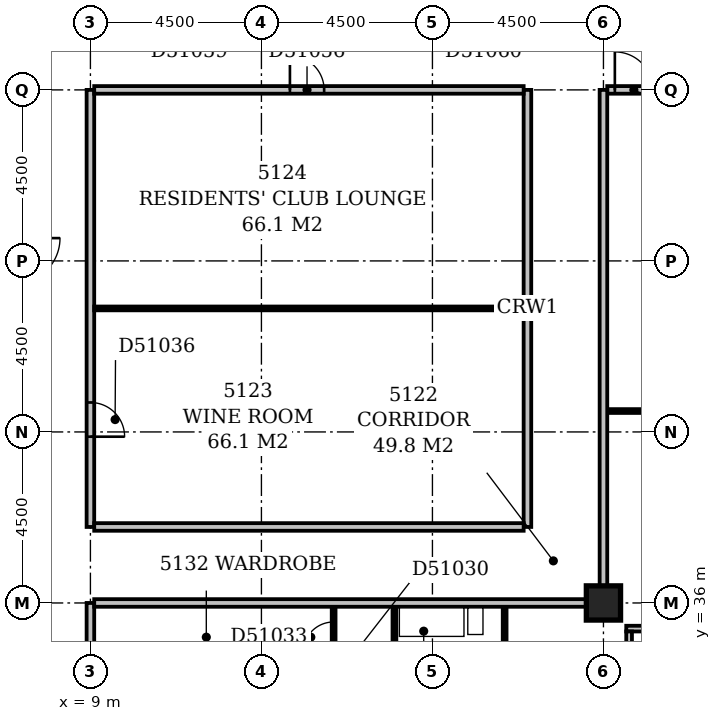
"""IFC4 building model, lengths in metres.
Left out: names, types, materials, properties, quantities, classifications, styles, units other than length and angle.
Written with IfcOpenShell. Run it as: python <this file> out.ifc"""

import sys

from ifc_helpers import new_model, si_unit, direction, frame, frame_2d, origin, origin_2d, place, context, subcontext, project, spatial, rectangle, extrude, element, fill, save


model = new_model("IFC4")
c1 = context("Model", 3, precision=1e-05, world=origin(), true_north=direction((0.0, 1.0)))
c2 = subcontext(c1, "Body", "Model", "MODEL_VIEW")
j1 = project(units=[si_unit("LENGTHUNIT", "METRE"), si_unit("PLANEANGLEUNIT", "RADIAN")], contexts=[c1])
p1 = place(None, origin())
s1 = spatial("IfcSite", under=j1, at=p1, CompositionType="ELEMENT")
p2 = place(p1, origin())
s2 = spatial("IfcBuilding", under=s1, at=p2, CompositionType="ELEMENT")
p3 = place(p2, frame((0.0, 0.0, 200.6)))
s3 = spatial("IfcBuildingStorey", under=s2, at=p3, CompositionType="ELEMENT", Elevation=200.6)
p4 = place(p3, frame((22.5, 36.0, -0.3), z_axis=(0.0, 0.0, 1.0), x_axis=(1.0, 0.0, 0.0)))
e1 = element("IfcColumn", 1, at=p4, inside=s3, PredefinedType="COLUMN", context=c2, shape_type="SweptSolid", body=[
    extrude(rectangle(XDim=0.9, YDim=0.9, at=origin_2d()), origin(), (0.0, 0.0, 1.0), 3.6),
])
p5 = place(p3, frame((23.175, 17.4, 0.0), z_axis=(0.0, 0.0, 1.0), x_axis=(0.0, 1.0, 0.0)))
e2 = element("IfcWall", 2, at=p5, inside=s3, PredefinedType="STANDARD", context=c2, shape_type="SweptSolid", body=[
    extrude(rectangle(XDim=17.85, YDim=0.15, at=frame_2d((8.925, 0.0))), origin(), (0.0, 0.0, 1.0), 2.7),
])
p6 = place(p5, frame((1.65, 0.0, 0.6)))
e3 = element("IfcOpeningElement", 3, at=p6, cuts=e2, PredefinedType="OPENING", context=c2, shape_type="SweptSolid", body=[
    extrude(rectangle(XDim=2.4, YDim=1.8, at=frame_2d((1.2, 0.9))), frame((0.0, 0.087, 0.0), z_axis=(0.0, -1.0, 0.0), x_axis=(1.0, 0.0, 0.0)), (0.0, 0.0, 1.0), 0.174),
])
p7 = place(p5, frame((6.15, 0.0, 0.6)))
e4 = element("IfcOpeningElement", 4, at=p7, cuts=e2, PredefinedType="OPENING", context=c2, shape_type="SweptSolid", body=[
    extrude(rectangle(XDim=2.4, YDim=1.8, at=frame_2d((1.2, 0.9))), frame((0.0, 0.087, 0.0), z_axis=(0.0, -1.0, 0.0), x_axis=(1.0, 0.0, 0.0)), (0.0, 0.0, 1.0), 0.174),
])
p8 = place(p5, frame((10.252, 0.0, 0.6)))
e5 = element("IfcOpeningElement", 5, at=p8, cuts=e2, PredefinedType="OPENING", context=c2, shape_type="SweptSolid", body=[
    extrude(rectangle(XDim=0.6, YDim=1.8, at=frame_2d((0.3, 0.9))), frame((0.0, 0.087, 0.0), z_axis=(0.0, -1.0, 0.0), x_axis=(1.0, 0.0, 0.0)), (0.0, 0.0, 1.0), 0.174),
])
p9 = place(p5, frame((12.756, 0.0, 0.6)))
e6 = element("IfcOpeningElement", 6, at=p9, cuts=e2, PredefinedType="OPENING", context=c2, shape_type="SweptSolid", body=[
    extrude(rectangle(XDim=0.6, YDim=1.8, at=frame_2d((0.3, 0.9))), frame((0.0, 0.087, 0.0), z_axis=(0.0, -1.0, 0.0), x_axis=(1.0, 0.0, 0.0)), (0.0, 0.0, 1.0), 0.174),
])
p10 = place(p5, frame((15.15, 0.0, 0.6)))
e7 = element("IfcOpeningElement", 7, at=p10, cuts=e2, PredefinedType="OPENING", context=c2, shape_type="SweptSolid", body=[
    extrude(rectangle(XDim=2.4, YDim=1.8, at=frame_2d((1.2, 0.9))), frame((0.0, 0.087, 0.0), z_axis=(0.0, -1.0, 0.0), x_axis=(1.0, 0.0, 0.0)), (0.0, 0.0, 1.0), 0.174),
])
p11 = place(p3, frame((23.1, 35.325, 0.0), z_axis=(0.0, 0.0, 1.0), x_axis=(1.0, 0.0, 0.0)))
e8 = element("IfcWall", 8, at=p11, inside=s3, PredefinedType="STANDARD", context=c2, shape_type="SweptSolid", body=[
    extrude(rectangle(XDim=27.15, YDim=0.15, at=frame_2d((13.575, 0.0))), origin(), (0.0, 0.0, 1.0), 2.7),
])
p12 = place(p11, frame((0.45, 0.0, 0.6)))
e9 = element("IfcOpeningElement", 9, at=p12, cuts=e8, PredefinedType="OPENING", context=c2, shape_type="SweptSolid", body=[
    extrude(rectangle(XDim=2.4, YDim=1.8, at=frame_2d((1.2, 0.9))), frame((0.0, 0.087, 0.0), z_axis=(0.0, -1.0, 0.0), x_axis=(1.0, 0.0, 0.0)), (0.0, 0.0, 1.0), 0.174),
])
p13 = place(p11, frame((4.95, 0.0, 0.6)))
e10 = element("IfcOpeningElement", 10, at=p13, cuts=e8, PredefinedType="OPENING", context=c2, shape_type="SweptSolid", body=[
    extrude(rectangle(XDim=2.4, YDim=1.8, at=frame_2d((1.2, 0.9))), frame((0.0, 0.087, 0.0), z_axis=(0.0, -1.0, 0.0), x_axis=(1.0, 0.0, 0.0)), (0.0, 0.0, 1.0), 0.174),
])
p14 = place(p11, frame((9.45, 0.0, 0.6)))
e11 = element("IfcOpeningElement", 11, at=p14, cuts=e8, PredefinedType="OPENING", context=c2, shape_type="SweptSolid", body=[
    extrude(rectangle(XDim=2.4, YDim=1.8, at=frame_2d((1.2, 0.9))), frame((0.0, 0.087, 0.0), z_axis=(0.0, -1.0, 0.0), x_axis=(1.0, 0.0, 0.0)), (0.0, 0.0, 1.0), 0.174),
])
p15 = place(p11, frame((13.95, 0.0, 0.6)))
e12 = element("IfcOpeningElement", 12, at=p15, cuts=e8, PredefinedType="OPENING", context=c2, shape_type="SweptSolid", body=[
    extrude(rectangle(XDim=2.4, YDim=1.8, at=frame_2d((1.2, 0.9))), frame((0.0, 0.087, 0.0), z_axis=(0.0, -1.0, 0.0), x_axis=(1.0, 0.0, 0.0)), (0.0, 0.0, 1.0), 0.174),
])
p16 = place(p11, frame((18.45, 0.0, 0.6)))
e13 = element("IfcOpeningElement", 13, at=p16, cuts=e8, PredefinedType="OPENING", context=c2, shape_type="SweptSolid", body=[
    extrude(rectangle(XDim=2.4, YDim=1.8, at=frame_2d((1.2, 0.9))), frame((0.0, 0.087, 0.0), z_axis=(0.0, -1.0, 0.0), x_axis=(1.0, 0.0, 0.0)), (0.0, 0.0, 1.0), 0.174),
])
p17 = place(p11, frame((22.95, 0.0, 0.6)))
e14 = element("IfcOpeningElement", 14, at=p17, cuts=e8, PredefinedType="OPENING", context=c2, shape_type="SweptSolid", body=[
    extrude(rectangle(XDim=2.4, YDim=1.8, at=frame_2d((1.2, 0.9))), frame((0.0, 0.087, 0.0), z_axis=(0.0, -1.0, 0.0), x_axis=(1.0, 0.0, 0.0)), (0.0, 0.0, 1.0), 0.174),
])
p18 = place(p3, frame((9.0, 5.0, 0.0), z_axis=(0.0, 0.0, 1.0), x_axis=(0.0, 1.0, 0.0)))
e15 = element("IfcWall", 15, at=p18, inside=s3, PredefinedType="PARTITIONING", context=c2, shape_type="SweptSolid", body=[
    extrude(rectangle(XDim=31.0, YDim=0.2, at=frame_2d((15.5, 0.0))), origin(), (0.0, 0.0, 1.0), 3.3),
])
p19 = place(p18, frame((18.4, 0.0, 0.0)))
e16 = element("IfcOpeningElement", 16, at=p19, cuts=e15, PredefinedType="OPENING", context=c2, shape_type="SweptSolid", body=[
    extrude(rectangle(XDim=1.0, YDim=2.1, at=frame_2d((0.5, 1.05))), frame((0.0, 0.112, 0.0), z_axis=(0.0, -1.0, 0.0), x_axis=(1.0, 0.0, 0.0)), (0.0, 0.0, 1.0), 0.224),
])
p20 = place(p18, frame((11.7, 0.0, 0.0)))
e17 = element("IfcOpeningElement", 17, at=p20, cuts=e15, PredefinedType="OPENING", context=c2, shape_type="SweptSolid", body=[
    extrude(rectangle(XDim=1.0, YDim=2.1, at=frame_2d((0.5, 1.05))), frame((0.0, 0.112, 0.0), z_axis=(0.0, -1.0, 0.0), x_axis=(1.0, 0.0, 0.0)), (0.0, 0.0, 1.0), 0.224),
])
p21 = place(p18, frame((1.5, 0.0, 0.0)))
e18 = element("IfcOpeningElement", 18, at=p21, cuts=e15, PredefinedType="OPENING", context=c2, shape_type="SweptSolid", body=[
    extrude(rectangle(XDim=0.9, YDim=2.1, at=frame_2d((0.45, 1.05))), frame((0.0, 0.112, 0.0), z_axis=(0.0, -1.0, 0.0), x_axis=(1.0, 0.0, 0.0)), (0.0, 0.0, 1.0), 0.224),
])
p22 = place(p3, frame((17.0, 18.1, 0.0), z_axis=(0.0, 0.0, 1.0), x_axis=(0.0, 1.0, 0.0)))
e19 = element("IfcWall", 19, at=p22, inside=s3, PredefinedType="PARTITIONING", context=c2, shape_type="SweptSolid", body=[
    extrude(rectangle(XDim=17.8, YDim=0.1, at=frame_2d((8.9, 0.0))), origin(), (0.0, 0.0, 1.0), 3.3),
])
p23 = place(p22, frame((2.85, 0.0, 0.0)))
e20 = element("IfcOpeningElement", 20, at=p23, cuts=e19, PredefinedType="OPENING", context=c2, shape_type="SweptSolid", body=[
    extrude(rectangle(XDim=0.9, YDim=2.1, at=frame_2d((0.45, 1.05))), frame((0.0, 0.062, 0.0), z_axis=(0.0, -1.0, 0.0), x_axis=(1.0, 0.0, 0.0)), (0.0, 0.0, 1.0), 0.124),
])
p24 = place(p22, frame((8.4, 0.0, 0.0)))
e21 = element("IfcOpeningElement", 21, at=p24, cuts=e19, PredefinedType="OPENING", context=c2, shape_type="SweptSolid", body=[
    extrude(rectangle(XDim=0.9, YDim=2.1, at=frame_2d((0.45, 1.05))), frame((0.0, 0.062, 0.0), z_axis=(0.0, -1.0, 0.0), x_axis=(1.0, 0.0, 0.0)), (0.0, 0.0, 1.0), 0.124),
])
p25 = place(p22, frame((14.05, 0.0, 0.0)))
e22 = element("IfcOpeningElement", 22, at=p25, cuts=e19, PredefinedType="OPENING", context=c2, shape_type="SweptSolid", body=[
    extrude(rectangle(XDim=0.9, YDim=2.1, at=frame_2d((0.45, 1.05))), frame((0.0, 0.062, 0.0), z_axis=(0.0, -1.0, 0.0), x_axis=(1.0, 0.0, 0.0)), (0.0, 0.0, 1.0), 0.124),
])
p26 = place(p3, frame((15.4, 24.7, 0.0), z_axis=(0.0, 0.0, 1.0), x_axis=(0.0, 1.0, 0.0)))
e23 = element("IfcWall", 23, at=p26, inside=s3, PredefinedType="PARTITIONING", context=c2, shape_type="SweptSolid", body=[
    extrude(rectangle(XDim=11.2, YDim=0.1, at=frame_2d((5.6, 0.0))), origin(), (0.0, 0.0, 1.0), 3.3),
])
p27 = place(p26, frame((0.8, 0.0, 0.0)))
e24 = element("IfcOpeningElement", 24, at=p27, cuts=e23, PredefinedType="OPENING", context=c2, shape_type="SweptSolid", body=[
    extrude(rectangle(XDim=0.8, YDim=2.1, at=frame_2d((0.4, 1.05))), frame((0.0, 0.062, 0.0), z_axis=(0.0, -1.0, 0.0), x_axis=(1.0, 0.0, 0.0)), (0.0, 0.0, 1.0), 0.124),
])
p28 = place(p26, frame((8.1, 0.0, 0.0)))
e25 = element("IfcOpeningElement", 25, at=p28, cuts=e23, PredefinedType="OPENING", context=c2, shape_type="SweptSolid", body=[
    extrude(rectangle(XDim=0.8, YDim=2.1, at=frame_2d((0.4, 1.05))), frame((0.0, 0.062, 0.0), z_axis=(0.0, -1.0, 0.0), x_axis=(1.0, 0.0, 0.0)), (0.0, 0.0, 1.0), 0.124),
])
p29 = place(p26, frame((4.3, 0.0, 0.0)))
e26 = element("IfcOpeningElement", 26, at=p29, cuts=e23, PredefinedType="OPENING", context=c2, shape_type="SweptSolid", body=[
    extrude(rectangle(XDim=0.8, YDim=2.1, at=frame_2d((0.4, 1.05))), frame((0.0, 0.062, 0.0), z_axis=(0.0, -1.0, 0.0), x_axis=(1.0, 0.0, 0.0)), (0.0, 0.0, 1.0), 0.124),
])
p30 = place(p26, frame((6.1, 0.0, 0.0)))
e27 = element("IfcOpeningElement", 27, at=p30, cuts=e23, PredefinedType="OPENING", context=c2, shape_type="SweptSolid", body=[
    extrude(rectangle(XDim=0.8, YDim=2.1, at=frame_2d((0.4, 1.05))), frame((0.0, 0.062, 0.0), z_axis=(0.0, -1.0, 0.0), x_axis=(1.0, 0.0, 0.0)), (0.0, 0.0, 1.0), 0.124),
])
p31 = place(p26, frame((10.0, 0.0, 0.0)))
e28 = element("IfcOpeningElement", 28, at=p31, cuts=e23, PredefinedType="OPENING", context=c2, shape_type="SweptSolid", body=[
    extrude(rectangle(XDim=0.8, YDim=2.1, at=frame_2d((0.4, 1.05))), frame((0.0, 0.062, 0.0), z_axis=(0.0, -1.0, 0.0), x_axis=(1.0, 0.0, 0.0)), (0.0, 0.0, 1.0), 0.124),
])
p32 = place(p26, frame((2.75, 0.0, 0.0)))
e29 = element("IfcOpeningElement", 29, at=p32, cuts=e23, PredefinedType="OPENING", context=c2, shape_type="SweptSolid", body=[
    extrude(rectangle(XDim=0.8, YDim=2.1, at=frame_2d((0.4, 1.05))), frame((0.0, 0.062, 0.0), z_axis=(0.0, -1.0, 0.0), x_axis=(1.0, 0.0, 0.0)), (0.0, 0.0, 1.0), 0.124),
])
p33 = place(p3, frame((19.9, 33.7, 0.0), z_axis=(0.0, 0.0, 1.0), x_axis=(0.0, 1.0, 0.0)))
e30 = element("IfcWall", 30, at=p33, inside=s3, PredefinedType="PLUMBINGWALL", context=c2, shape_type="SweptSolid", body=[
    extrude(rectangle(XDim=2.2, YDim=0.1, at=frame_2d((1.1, 0.0))), origin(), (0.0, 0.0, 1.0), 3.3),
])
p34 = place(p3, frame((9.1, 36.0, 0.0), z_axis=(0.0, 0.0, 1.0), x_axis=(1.0, 0.0, 0.0)))
e31 = element("IfcWall", 31, at=p34, inside=s3, PredefinedType="PARTITIONING", context=c2, shape_type="SweptSolid", body=[
    extrude(rectangle(XDim=12.95, YDim=0.2, at=frame_2d((6.475, 0.0))), origin(), (0.0, 0.0, 1.0), 3.3),
])
p35 = place(p3, frame((22.5, 36.45, 0.0), z_axis=(0.0, 0.0, 1.0), x_axis=(0.0, 1.0, 0.0)))
e32 = element("IfcWall", 32, at=p35, inside=s3, PredefinedType="PARTITIONING", context=c2, shape_type="SweptSolid", body=[
    extrude(rectangle(XDim=13.05, YDim=0.2, at=frame_2d((6.525, 0.0))), origin(), (0.0, 0.0, 1.0), 3.3),
])
p36 = place(p3, frame((9.0, 38.0, 0.0), z_axis=(0.0, 0.0, 1.0), x_axis=(0.0, 1.0, 0.0)))
e33 = element("IfcWall", 33, at=p36, inside=s3, PredefinedType="PARTITIONING", context=c2, shape_type="SweptSolid", body=[
    extrude(rectangle(XDim=11.5, YDim=0.2, at=frame_2d((5.75, 0.0))), origin(), (0.0, 0.0, 1.0), 3.3),
])
p37 = place(p36, frame((2.375, 0.0, 0.0)))
e34 = element("IfcOpeningElement", 34, at=p37, cuts=e33, PredefinedType="OPENING", context=c2, shape_type="SweptSolid", body=[
    extrude(rectangle(XDim=0.9, YDim=2.1, at=frame_2d((0.45, 1.05))), frame((0.0, 0.112, 0.0), z_axis=(0.0, -1.0, 0.0), x_axis=(1.0, 0.0, 0.0)), (0.0, 0.0, 1.0), 0.224),
])
p38 = place(p3, frame((9.1, 38.0, 0.0), z_axis=(0.0, 0.0, 1.0), x_axis=(1.0, 0.0, 0.0)))
e35 = element("IfcWall", 35, at=p38, inside=s3, PredefinedType="PARTITIONING", context=c2, shape_type="SweptSolid", body=[
    extrude(rectangle(XDim=11.3, YDim=0.2, at=frame_2d((5.65, 0.0))), origin(), (0.0, 0.0, 1.0), 3.3),
])
p39 = place(p3, frame((20.5, 38.0, 0.0), z_axis=(0.0, 0.0, 1.0), x_axis=(0.0, 1.0, 0.0)))
e36 = element("IfcWall", 36, at=p39, inside=s3, PredefinedType="PARTITIONING", context=c2, shape_type="SweptSolid", body=[
    extrude(rectangle(XDim=11.5, YDim=0.2, at=frame_2d((5.75, 0.0))), origin(), (0.0, 0.0, 1.0), 3.3),
])
p40 = place(p3, frame((22.6, 41.05, 0.0), z_axis=(0.0, 0.0, 1.0), x_axis=(1.0, 0.0, 0.0)))
e37 = element("IfcWall", 37, at=p40, inside=s3, PredefinedType="PARTITIONING", context=c2, shape_type="SweptSolid", body=[
    extrude(rectangle(XDim=22.3, YDim=0.1, at=frame_2d((11.15, 0.0))), origin(), (0.0, 0.0, 1.0), 3.3),
])
p41 = place(p40, frame((3.9, 0.0, 0.0)))
e38 = element("IfcOpeningElement", 38, at=p41, cuts=e37, PredefinedType="OPENING", context=c2, shape_type="SweptSolid", body=[
    extrude(rectangle(XDim=0.9, YDim=2.1, at=frame_2d((0.45, 1.05))), frame((0.0, 0.062, 0.0), z_axis=(0.0, -1.0, 0.0), x_axis=(1.0, 0.0, 0.0)), (0.0, 0.0, 1.0), 0.124),
])
p42 = place(p40, frame((9.55, 0.0, 0.0)))
e39 = element("IfcOpeningElement", 39, at=p42, cuts=e37, PredefinedType="OPENING", context=c2, shape_type="SweptSolid", body=[
    extrude(rectangle(XDim=0.9, YDim=2.1, at=frame_2d((0.45, 1.05))), frame((0.0, 0.062, 0.0), z_axis=(0.0, -1.0, 0.0), x_axis=(1.0, 0.0, 0.0)), (0.0, 0.0, 1.0), 0.124),
])
p43 = place(p40, frame((16.35, 0.0, 0.0)))
e40 = element("IfcOpeningElement", 40, at=p43, cuts=e37, PredefinedType="OPENING", context=c2, shape_type="SweptSolid", body=[
    extrude(rectangle(XDim=0.9, YDim=2.1, at=frame_2d((0.45, 1.05))), frame((0.0, 0.062, 0.0), z_axis=(0.0, -1.0, 0.0), x_axis=(1.0, 0.0, 0.0)), (0.0, 0.0, 1.0), 0.124),
])
p44 = place(p40, frame((19.7, 0.0, 0.0)))
e41 = element("IfcOpeningElement", 41, at=p44, cuts=e37, PredefinedType="OPENING", context=c2, shape_type="SweptSolid", body=[
    extrude(rectangle(XDim=0.9, YDim=2.1, at=frame_2d((0.45, 1.05))), frame((0.0, 0.062, 0.0), z_axis=(0.0, -1.0, 0.0), x_axis=(1.0, 0.0, 0.0)), (0.0, 0.0, 1.0), 0.124),
])
p45 = place(p3, frame((9.1, 43.75, 0.0), z_axis=(0.0, 0.0, 1.0), x_axis=(1.0, 0.0, 0.0)))
e42 = element("IfcWall", 42, at=p45, inside=s3, PredefinedType="PARTITIONING", context=c2, shape_type="SweptSolid", body=[
    extrude(rectangle(XDim=11.3, YDim=0.1, at=frame_2d((5.65, 0.0))), origin(), (0.0, 0.0, 1.0), 3.3),
])
p46 = place(p3, frame((9.1, 49.5, 0.0), z_axis=(0.0, 0.0, 1.0), x_axis=(1.0, 0.0, 0.0)))
e43 = element("IfcWall", 43, at=p46, inside=s3, PredefinedType="PARTITIONING", context=c2, shape_type="SweptSolid", body=[
    extrude(rectangle(XDim=11.3, YDim=0.2, at=frame_2d((5.65, 0.0))), origin(), (0.0, 0.0, 1.0), 3.3),
])
p47 = place(p46, frame((5.15, 0.0, 0.0)))
e44 = element("IfcOpeningElement", 44, at=p47, cuts=e43, PredefinedType="OPENING", context=c2, shape_type="SweptSolid", body=[
    extrude(rectangle(XDim=0.9, YDim=2.1, at=frame_2d((0.45, 1.05))), frame((0.0, 0.112, 0.0), z_axis=(0.0, -1.0, 0.0), x_axis=(1.0, 0.0, 0.0)), (0.0, 0.0, 1.0), 0.224),
])
p48 = place(p3, frame((22.6, 49.5, 0.0), z_axis=(0.0, 0.0, 1.0), x_axis=(1.0, 0.0, 0.0)))
e45 = element("IfcWall", 45, at=p48, inside=s3, PredefinedType="PARTITIONING", context=c2, shape_type="SweptSolid", body=[
    extrude(rectangle(XDim=30.95, YDim=0.2, at=frame_2d((15.475, 0.0))), origin(), (0.0, 0.0, 1.0), 3.3),
])
p49 = place(p48, frame((0.2, 0.0, 0.0)))
e46 = element("IfcOpeningElement", 46, at=p49, cuts=e45, PredefinedType="OPENING", context=c2, shape_type="SweptSolid", body=[
    extrude(rectangle(XDim=1.0, YDim=2.1, at=frame_2d((0.5, 1.05))), frame((0.0, 0.112, 0.0), z_axis=(0.0, -1.0, 0.0), x_axis=(1.0, 0.0, 0.0)), (0.0, 0.0, 1.0), 0.224),
])
p50 = place(p48, frame((22.7, 0.0, 0.0)))
e47 = element("IfcOpeningElement", 47, at=p50, cuts=e45, PredefinedType="OPENING", context=c2, shape_type="SweptSolid", body=[
    extrude(rectangle(XDim=1.0, YDim=2.1, at=frame_2d((0.5, 1.05))), frame((0.0, 0.112, 0.0), z_axis=(0.0, -1.0, 0.0), x_axis=(1.0, 0.0, 0.0)), (0.0, 0.0, 1.0), 0.224),
])
p51 = place(p31, origin())
e48 = element("IfcDoor", 48, at=p51, inside=s3, OperationType="SINGLE_SWING_LEFT", PredefinedType="DOOR", context=c2, shape_type="SweptSolid", body=[
    extrude(rectangle(XDim=0.8, YDim=2.1, at=frame_2d((0.4, 1.05))), frame((0.0, 0.025, 0.0), z_axis=(0.0, -1.0, 0.0), x_axis=(1.0, 0.0, 0.0)), (0.0, 0.0, 1.0), 0.05),
])
fill(e28, e48)
p52 = place(p37, frame((0.9, 0.0, 0.0), z_axis=(0.0, 0.0, 1.0), x_axis=(-1.0, 0.0, 0.0)))
e49 = element("IfcDoor", 49, at=p52, inside=s3, OperationType="SINGLE_SWING_RIGHT", PredefinedType="DOOR", context=c2, shape_type="SweptSolid", body=[
    extrude(rectangle(XDim=0.9, YDim=2.1, at=frame_2d((0.45, 1.05))), frame((0.0, 0.025, 0.0), z_axis=(0.0, -1.0, 0.0), x_axis=(1.0, 0.0, 0.0)), (0.0, 0.0, 1.0), 0.05),
])
fill(e34, e49)
p53 = place(p47, origin())
e50 = element("IfcDoor", 50, at=p53, inside=s3, OperationType="SINGLE_SWING_LEFT", PredefinedType="DOOR", context=c2, shape_type="SweptSolid", body=[
    extrude(rectangle(XDim=0.9, YDim=2.1, at=frame_2d((0.45, 1.05))), frame((0.0, 0.025, 0.0), z_axis=(0.0, -1.0, 0.0), x_axis=(1.0, 0.0, 0.0)), (0.0, 0.0, 1.0), 0.05),
])
fill(e44, e50)
p54 = place(p49, origin())
e51 = element("IfcDoor", 51, at=p54, inside=s3, OperationType="SINGLE_SWING_LEFT", PredefinedType="DOOR", context=c2, shape_type="SweptSolid", body=[
    extrude(rectangle(XDim=1.0, YDim=2.1, at=frame_2d((0.5, 1.05))), frame((0.0, 0.025, 0.0), z_axis=(0.0, -1.0, 0.0), x_axis=(1.0, 0.0, 0.0)), (0.0, 0.0, 1.0), 0.05),
])
fill(e46, e51)
save(model, sys.argv[1])
